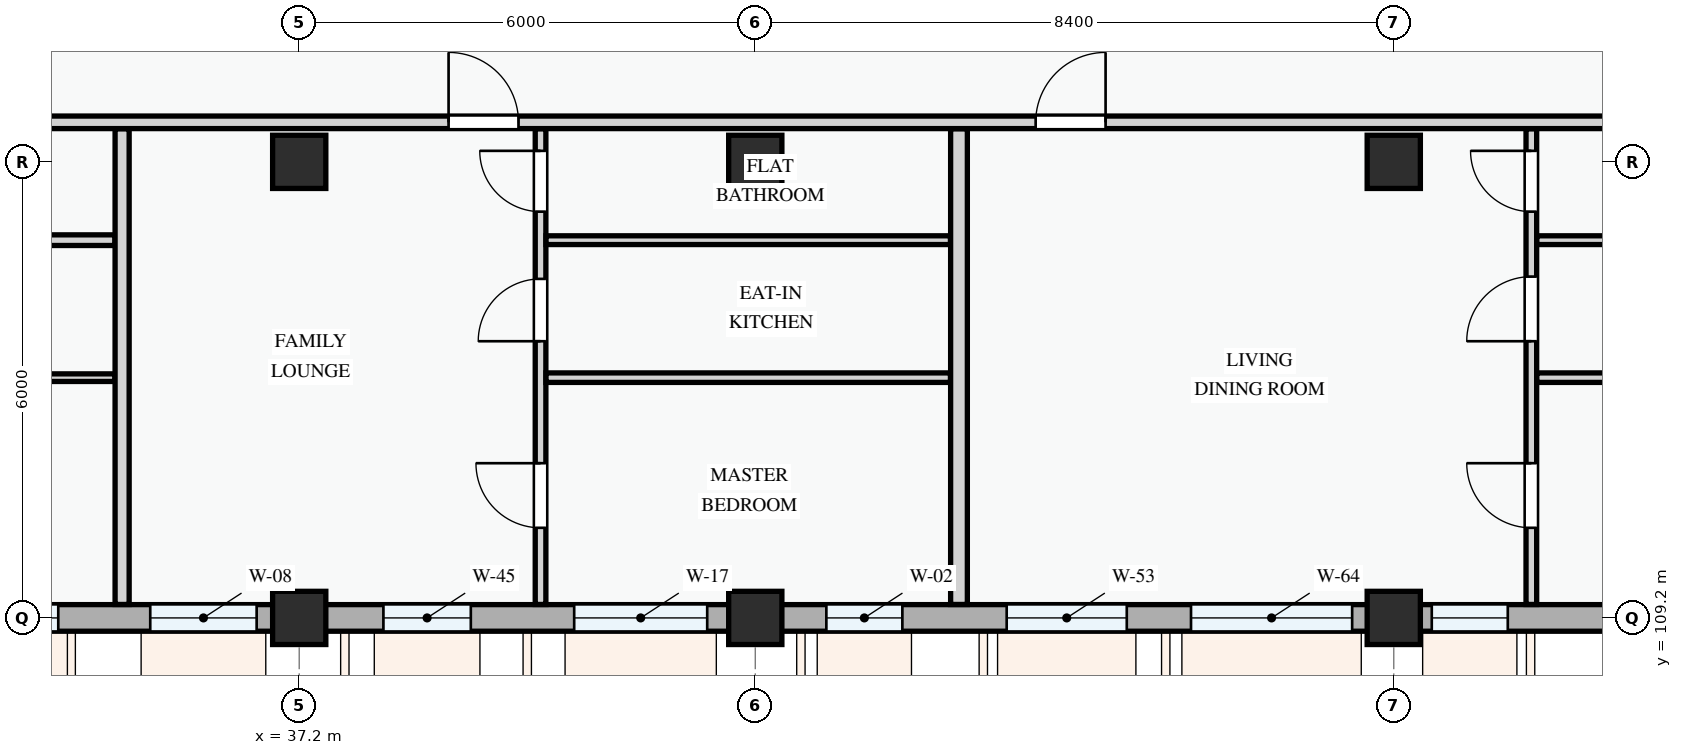
"""IFC4 building model, lengths in metres.
Left out: names, types, materials, properties, quantities, classifications, styles, units other than length and angle.
Written with IfcOpenShell. Run it as: python <this file> out.ifc"""

import sys

from ifc_helpers import new_model, si_unit, direction, frame, frame_2d, origin, origin_2d, place, context, subcontext, project, spatial, rectangle, extrude, element, fill, save


model = new_model("IFC4")
c1 = context("Model", 3, precision=1e-05, world=origin(), true_north=direction((0.0, 1.0)))
c2 = subcontext(c1, "Body", "Model", "MODEL_VIEW")
j1 = project(units=[si_unit("LENGTHUNIT", "METRE"), si_unit("PLANEANGLEUNIT", "RADIAN")], contexts=[c1])
p1 = place(None, origin())
s1 = spatial("IfcSite", under=j1, at=p1, CompositionType="ELEMENT")
p2 = place(p1, origin())
s2 = spatial("IfcBuilding", under=s1, at=p2, CompositionType="ELEMENT")
p3 = place(p2, frame((0.0, 0.0, 14.7)))
s3 = spatial("IfcBuildingStorey", under=s2, at=p3, CompositionType="ELEMENT", Elevation=14.7)
for number, where, z_axis, x_axis in (
    (1, (37.2, 109.2, 0.0), (0.0, 0.0, 1.0), (1.0, 0.0, 0.0)),
    (2, (37.2, 115.2, 0.0), (0.0, 0.0, 1.0), (1.0, 0.0, 0.0)),
    (3, (43.2, 109.2, 0.0), (0.0, 0.0, 1.0), (1.0, 0.0, 0.0)),
    (4, (43.2, 115.2, 0.0), (0.0, 0.0, 1.0), (1.0, 0.0, 0.0)),
    (5, (51.6, 109.2, 0.0), (0.0, 0.0, 1.0), (1.0, 0.0, 0.0)),
    (6, (51.6, 115.2, 0.0), (0.0, 0.0, 1.0), (1.0, 0.0, 0.0)),
):
    element("IfcColumn", number, at=place(p3, frame(where, z_axis=z_axis, x_axis=x_axis)), inside=s3, PredefinedType="COLUMN", context=c2, shape_type="SweptSolid", body=[
        extrude(rectangle(XDim=0.7, YDim=0.7, at=origin_2d()), origin(), (0.0, 0.0, 1.0), 3.3),
    ])
p4 = place(p3, frame((28.8, 109.2, 0.0), z_axis=(0.0, 0.0, 1.0), x_axis=(1.0, 0.0, 0.0)))
e7 = element("IfcWall", 7, at=p4, inside=s3, PredefinedType="STANDARD", context=c2, shape_type="SweptSolid", body=[
    extrude(rectangle(XDim=8.4, YDim=0.35, at=frame_2d((4.2, 0.0))), origin(), (0.0, 0.0, 1.0), 2.375),
])
p5 = place(p4, frame((0.525, 0.0, 0.78)))
e8 = element("IfcOpeningElement", 8, at=p5, cuts=e7, PredefinedType="OPENING", context=c2, shape_type="SweptSolid", body=[
    extrude(rectangle(XDim=0.95, YDim=1.15, at=frame_2d((0.475, 0.575))), frame((0.0, 0.185, 0.0), z_axis=(0.0, -1.0, 0.0), x_axis=(1.0, 0.0, 0.0)), (0.0, 0.0, 1.0), 0.37),
])
p6 = place(p4, frame((2.65, 0.0, 0.78)))
e9 = element("IfcOpeningElement", 9, at=p6, cuts=e7, PredefinedType="OPENING", context=c2, shape_type="SweptSolid", body=[
    extrude(rectangle(XDim=2.58, YDim=1.48, at=frame_2d((1.29, 0.74))), frame((0.0, 0.185, 0.0), z_axis=(0.0, -1.0, 0.0), x_axis=(1.0, 0.0, 0.0)), (0.0, 0.0, 1.0), 0.37),
])
p7 = place(p4, frame((6.44, 0.0, 0.78)))
e10 = element("IfcOpeningElement", 10, at=p7, cuts=e7, PredefinedType="OPENING", context=c2, shape_type="SweptSolid", body=[
    extrude(rectangle(XDim=1.4, YDim=1.45, at=frame_2d((0.7, 0.725))), frame((0.0, 0.185, 0.0), z_axis=(0.0, -1.0, 0.0), x_axis=(1.0, 0.0, 0.0)), (0.0, 0.0, 1.0), 0.37),
])
p8 = place(p3, frame((37.2, 109.2, 0.0), z_axis=(0.0, 0.0, 1.0), x_axis=(1.0, 0.0, 0.0)))
e11 = element("IfcWall", 11, at=p8, inside=s3, PredefinedType="STANDARD", context=c2, shape_type="SweptSolid", body=[
    extrude(rectangle(XDim=6.0, YDim=0.35, at=frame_2d((3.0, 0.0))), origin(), (0.0, 0.0, 1.0), 2.475),
])
p9 = place(p8, frame((1.107, 0.0, 0.78)))
e12 = element("IfcOpeningElement", 12, at=p9, cuts=e11, PredefinedType="OPENING", context=c2, shape_type="SweptSolid", body=[
    extrude(rectangle(XDim=1.15, YDim=1.25, at=frame_2d((0.575, 0.625))), frame((0.0, 0.185, 0.0), z_axis=(0.0, -1.0, 0.0), x_axis=(1.0, 0.0, 0.0)), (0.0, 0.0, 1.0), 0.37),
])
p10 = place(p8, frame((3.617, 0.0, 0.78)))
e13 = element("IfcOpeningElement", 13, at=p10, cuts=e11, PredefinedType="OPENING", context=c2, shape_type="SweptSolid", body=[
    extrude(rectangle(XDim=1.75, YDim=1.45, at=frame_2d((0.875, 0.725))), frame((0.0, 0.185, 0.0), z_axis=(0.0, -1.0, 0.0), x_axis=(1.0, 0.0, 0.0)), (0.0, 0.0, 1.0), 0.37),
])
p11 = place(p3, frame((43.2, 109.2, 0.0), z_axis=(0.0, 0.0, 1.0), x_axis=(1.0, 0.0, 0.0)))
e14 = element("IfcWall", 14, at=p11, inside=s3, PredefinedType="STANDARD", context=c2, shape_type="SweptSolid", body=[
    extrude(rectangle(XDim=8.4, YDim=0.35, at=frame_2d((4.2, 0.0))), origin(), (0.0, 0.0, 1.0), 2.375),
])
p12 = place(p11, frame((0.935, 0.0, 0.78)))
e15 = element("IfcOpeningElement", 15, at=p12, cuts=e14, PredefinedType="OPENING", context=c2, shape_type="SweptSolid", body=[
    extrude(rectangle(XDim=1.0, YDim=1.25, at=frame_2d((0.5, 0.625))), frame((0.0, 0.185, 0.0), z_axis=(0.0, -1.0, 0.0), x_axis=(1.0, 0.0, 0.0)), (0.0, 0.0, 1.0), 0.37),
])
p13 = place(p11, frame((3.308, 0.0, 0.78)))
e16 = element("IfcOpeningElement", 16, at=p13, cuts=e14, PredefinedType="OPENING", context=c2, shape_type="SweptSolid", body=[
    extrude(rectangle(XDim=1.58, YDim=1.48, at=frame_2d((0.79, 0.74))), frame((0.0, 0.185, 0.0), z_axis=(0.0, -1.0, 0.0), x_axis=(1.0, 0.0, 0.0)), (0.0, 0.0, 1.0), 0.37),
])
p14 = place(p11, frame((5.732, 0.0, 0.78)))
e17 = element("IfcOpeningElement", 17, at=p14, cuts=e14, PredefinedType="OPENING", context=c2, shape_type="SweptSolid", body=[
    extrude(rectangle(XDim=2.12, YDim=1.44, at=frame_2d((1.06, 0.72))), frame((0.0, 0.185, 0.0), z_axis=(0.0, -1.0, 0.0), x_axis=(1.0, 0.0, 0.0)), (0.0, 0.0, 1.0), 0.37),
])
p15 = place(p3, frame((51.6, 109.2, 0.0), z_axis=(0.0, 0.0, 1.0), x_axis=(1.0, 0.0, 0.0)))
e18 = element("IfcWall", 18, at=p15, inside=s3, PredefinedType="STANDARD", context=c2, shape_type="SweptSolid", body=[
    extrude(rectangle(XDim=6.0, YDim=0.35, at=frame_2d((3.0, 0.0))), origin(), (0.0, 0.0, 1.0), 2.475),
])
p16 = place(p15, frame((0.5, 0.0, 0.78)))
e19 = element("IfcOpeningElement", 19, at=p16, cuts=e18, PredefinedType="OPENING", context=c2, shape_type="SweptSolid", body=[
    extrude(rectangle(XDim=1.0, YDim=1.25, at=frame_2d((0.5, 0.625))), frame((0.0, 0.185, 0.0), z_axis=(0.0, -1.0, 0.0), x_axis=(1.0, 0.0, 0.0)), (0.0, 0.0, 1.0), 0.37),
])
p17 = place(p15, frame((3.185, 0.0, 0.78)))
e20 = element("IfcOpeningElement", 20, at=p17, cuts=e18, PredefinedType="OPENING", context=c2, shape_type="SweptSolid", body=[
    extrude(rectangle(XDim=1.25, YDim=1.3, at=frame_2d((0.625, 0.65))), frame((0.0, 0.185, 0.0), z_axis=(0.0, -1.0, 0.0), x_axis=(1.0, 0.0, 0.0)), (0.0, 0.0, 1.0), 0.37),
])
p18 = place(p3, frame((30.669, 112.361, 0.0), z_axis=(0.0, 0.0, 1.0), x_axis=(1.0, 0.0, 0.0)))
e21 = element("IfcWall", 21, at=p18, inside=s3, PredefinedType="PARTITIONING", context=c2, shape_type="SweptSolid", body=[
    extrude(rectangle(XDim=4.106, YDim=0.1, at=frame_2d((2.053, 0.0))), origin(), (0.0, 0.0, 1.0), 3.0),
])
p19 = place(p3, frame((30.669, 114.17, 0.0), z_axis=(0.0, 0.0, 1.0), x_axis=(1.0, 0.0, 0.0)))
e22 = element("IfcWall", 22, at=p19, inside=s3, PredefinedType="PARTITIONING", context=c2, shape_type="SweptSolid", body=[
    extrude(rectangle(XDim=4.106, YDim=0.14, at=frame_2d((2.053, 0.0))), origin(), (0.0, 0.0, 1.0), 3.0),
])
p20 = place(p3, frame((40.375, 109.377, 0.0), z_axis=(0.0, 0.0, 1.0), x_axis=(0.0, 1.0, 0.0)))
e23 = element("IfcWall", 23, at=p20, inside=s3, PredefinedType="PARTITIONING", context=c2, shape_type="SweptSolid", body=[
    extrude(rectangle(XDim=6.259, YDim=0.14, at=frame_2d((3.129, 0.0))), origin(), (0.0, 0.0, 1.0), 3.0),
])
p21 = place(p20, frame((1.008, 0.0, 0.0)))
e24 = element("IfcOpeningElement", 24, at=p21, cuts=e23, PredefinedType="OPENING", context=c2, shape_type="SweptSolid", body=[
    extrude(rectangle(XDim=0.85, YDim=2.1, at=frame_2d((0.425, 1.05))), frame((0.0, 0.08, 0.0), z_axis=(0.0, -1.0, 0.0), x_axis=(1.0, 0.0, 0.0)), (0.0, 0.0, 1.0), 0.16),
])
p22 = place(p20, frame((3.463, 0.0, 0.0)))
e25 = element("IfcOpeningElement", 25, at=p22, cuts=e23, PredefinedType="OPENING", context=c2, shape_type="SweptSolid", body=[
    extrude(rectangle(XDim=0.82, YDim=2.08, at=frame_2d((0.41, 1.04))), frame((0.0, 0.08, 0.0), z_axis=(0.0, -1.0, 0.0), x_axis=(1.0, 0.0, 0.0)), (0.0, 0.0, 1.0), 0.16),
])
p23 = place(p20, frame((5.168, 0.0, 0.0)))
e26 = element("IfcOpeningElement", 26, at=p23, cuts=e23, PredefinedType="OPENING", context=c2, shape_type="SweptSolid", body=[
    extrude(rectangle(XDim=0.8, YDim=2.1, at=frame_2d((0.4, 1.05))), frame((0.0, 0.08, 0.0), z_axis=(0.0, -1.0, 0.0), x_axis=(1.0, 0.0, 0.0)), (0.0, 0.0, 1.0), 0.16),
])
p24 = place(p3, frame((40.447, 112.361, 0.0), z_axis=(0.0, 0.0, 1.0), x_axis=(1.0, 0.0, 0.0)))
e27 = element("IfcWall", 27, at=p24, inside=s3, PredefinedType="PARTITIONING", context=c2, shape_type="SweptSolid", body=[
    extrude(rectangle(XDim=5.321, YDim=0.125, at=frame_2d((2.661, 0.0))), origin(), (0.0, 0.0, 1.0), 3.0),
])
p25 = place(p3, frame((40.447, 114.17, 0.0), z_axis=(0.0, 0.0, 1.0), x_axis=(1.0, 0.0, 0.0)))
e28 = element("IfcWall", 28, at=p25, inside=s3, PredefinedType="PARTITIONING", context=c2, shape_type="SweptSolid", body=[
    extrude(rectangle(XDim=5.321, YDim=0.115, at=frame_2d((2.661, 0.0))), origin(), (0.0, 0.0, 1.0), 3.0),
])
p26 = place(p3, frame((34.87, 109.377, 0.0), z_axis=(0.0, 0.0, 1.0), x_axis=(0.0, 1.0, 0.0)))
e29 = element("IfcWall", 29, at=p26, inside=s3, PredefinedType="PARTITIONING", context=c2, shape_type="SweptSolid", body=[
    extrude(rectangle(XDim=6.259, YDim=0.185, at=frame_2d((3.129, 0.0))), origin(), (0.0, 0.0, 1.0), 3.0),
])
p27 = place(p3, frame((53.41, 109.377, 0.0), z_axis=(0.0, 0.0, 1.0), x_axis=(0.0, 1.0, 0.0)))
e30 = element("IfcWall", 30, at=p27, inside=s3, PredefinedType="PARTITIONING", context=c2, shape_type="SweptSolid", body=[
    extrude(rectangle(XDim=6.259, YDim=0.14, at=frame_2d((3.129, 0.0))), origin(), (0.0, 0.0, 1.0), 3.0),
])
p28 = place(p27, frame((1.008, 0.0, 0.0)))
e31 = element("IfcOpeningElement", 31, at=p28, cuts=e30, PredefinedType="OPENING", context=c2, shape_type="SweptSolid", body=[
    extrude(rectangle(XDim=0.85, YDim=2.1, at=frame_2d((0.425, 1.05))), frame((0.0, 0.08, 0.0), z_axis=(0.0, -1.0, 0.0), x_axis=(1.0, 0.0, 0.0)), (0.0, 0.0, 1.0), 0.16),
])
p29 = place(p27, frame((3.463, 0.0, 0.0)))
e32 = element("IfcOpeningElement", 32, at=p29, cuts=e30, PredefinedType="OPENING", context=c2, shape_type="SweptSolid", body=[
    extrude(rectangle(XDim=0.85, YDim=2.1, at=frame_2d((0.425, 1.05))), frame((0.0, 0.08, 0.0), z_axis=(0.0, -1.0, 0.0), x_axis=(1.0, 0.0, 0.0)), (0.0, 0.0, 1.0), 0.16),
])
p30 = place(p27, frame((5.168, 0.0, 0.0)))
e33 = element("IfcOpeningElement", 33, at=p30, cuts=e30, PredefinedType="OPENING", context=c2, shape_type="SweptSolid", body=[
    extrude(rectangle(XDim=0.8, YDim=2.1, at=frame_2d((0.4, 1.05))), frame((0.0, 0.08, 0.0), z_axis=(0.0, -1.0, 0.0), x_axis=(1.0, 0.0, 0.0)), (0.0, 0.0, 1.0), 0.16),
])
p31 = place(p3, frame((53.482, 112.361, 0.0), z_axis=(0.0, 0.0, 1.0), x_axis=(1.0, 0.0, 0.0)))
e34 = element("IfcWall", 34, at=p31, inside=s3, PredefinedType="PARTITIONING", context=c2, shape_type="SweptSolid", body=[
    extrude(rectangle(XDim=3.941, YDim=0.125, at=frame_2d((1.971, 0.0))), origin(), (0.0, 0.0, 1.0), 3.0),
])
p32 = place(p3, frame((53.482, 114.17, 0.0), z_axis=(0.0, 0.0, 1.0), x_axis=(1.0, 0.0, 0.0)))
e35 = element("IfcWall", 35, at=p32, inside=s3, PredefinedType="PARTITIONING", context=c2, shape_type="SweptSolid", body=[
    extrude(rectangle(XDim=3.941, YDim=0.115, at=frame_2d((1.971, 0.0))), origin(), (0.0, 0.0, 1.0), 3.0),
])
p33 = place(p3, frame((45.88, 109.377, 0.0), z_axis=(0.0, 0.0, 1.0), x_axis=(0.0, 1.0, 0.0)))
e36 = element("IfcWall", 36, at=p33, inside=s3, PredefinedType="PARTITIONING", context=c2, shape_type="SweptSolid", body=[
    extrude(rectangle(XDim=6.259, YDim=0.22, at=frame_2d((3.129, 0.0))), origin(), (0.0, 0.0, 1.0), 3.0),
])
p34 = place(p3, frame((25.15, 115.72, 0.0), z_axis=(0.0, 0.0, 1.0), x_axis=(1.0, 0.0, 0.0)))
e37 = element("IfcWall", 37, at=p34, inside=s3, PredefinedType="PARTITIONING", context=c2, shape_type="SweptSolid", body=[
    extrude(rectangle(XDim=32.273, YDim=0.165, at=frame_2d((16.137, 0.0))), origin(), (0.0, 0.0, 1.0), 3.0),
])
p35 = place(p34, frame((0.25, 0.0, 0.0)))
e38 = element("IfcOpeningElement", 38, at=p35, cuts=e37, PredefinedType="OPENING", context=c2, shape_type="SweptSolid", body=[
    extrude(rectangle(XDim=0.92, YDim=2.1, at=frame_2d((0.46, 1.05))), frame((0.0, 0.093, 0.0), z_axis=(0.0, -1.0, 0.0), x_axis=(1.0, 0.0, 0.0)), (0.0, 0.0, 1.0), 0.185),
])
p36 = place(p34, frame((14.015, 0.0, 0.0)))
e39 = element("IfcOpeningElement", 39, at=p36, cuts=e37, PredefinedType="OPENING", context=c2, shape_type="SweptSolid", body=[
    extrude(rectangle(XDim=0.92, YDim=2.1, at=frame_2d((0.46, 1.05))), frame((0.0, 0.093, 0.0), z_axis=(0.0, -1.0, 0.0), x_axis=(1.0, 0.0, 0.0)), (0.0, 0.0, 1.0), 0.185),
])
p37 = place(p34, frame((21.739, 0.0, 0.0)))
e40 = element("IfcOpeningElement", 40, at=p37, cuts=e37, PredefinedType="OPENING", context=c2, shape_type="SweptSolid", body=[
    extrude(rectangle(XDim=0.92, YDim=2.1, at=frame_2d((0.46, 1.05))), frame((0.0, 0.093, 0.0), z_axis=(0.0, -1.0, 0.0), x_axis=(1.0, 0.0, 0.0)), (0.0, 0.0, 1.0), 0.185),
])
p38 = place(p6, origin())
e41 = element("IfcWindow", 41, at=p38, inside=s3, PartitioningType="DOUBLE_PANEL_VERTICAL", PredefinedType="WINDOW", context=c2, shape_type="SweptSolid", body=[
    extrude(rectangle(XDim=2.58, YDim=1.48, at=frame_2d((1.29, 0.74))), frame((0.0, 0.03, 0.0), z_axis=(0.0, -1.0, 0.0), x_axis=(1.0, 0.0, 0.0)), (0.0, 0.0, 1.0), 0.06),
])
fill(e9, e41)
p39 = place(p7, origin())
e42 = element("IfcWindow", 42, at=p39, inside=s3, PartitioningType="SINGLE_PANEL", PredefinedType="WINDOW", context=c2, shape_type="SweptSolid", body=[
    extrude(rectangle(XDim=1.4, YDim=1.45, at=frame_2d((0.7, 0.725))), frame((0.0, 0.03, 0.0), z_axis=(0.0, -1.0, 0.0), x_axis=(1.0, 0.0, 0.0)), (0.0, 0.0, 1.0), 0.06),
])
fill(e10, e42)
p40 = place(p9, origin())
e43 = element("IfcWindow", 43, at=p40, inside=s3, PartitioningType="SINGLE_PANEL", PredefinedType="WINDOW", context=c2, shape_type="SweptSolid", body=[
    extrude(rectangle(XDim=1.15, YDim=1.25, at=frame_2d((0.575, 0.625))), frame((0.0, 0.03, 0.0), z_axis=(0.0, -1.0, 0.0), x_axis=(1.0, 0.0, 0.0)), (0.0, 0.0, 1.0), 0.06),
])
fill(e12, e43)
p41 = place(p10, origin())
e44 = element("IfcWindow", 44, at=p41, inside=s3, PartitioningType="DOUBLE_PANEL_VERTICAL", PredefinedType="WINDOW", context=c2, shape_type="SweptSolid", body=[
    extrude(rectangle(XDim=1.75, YDim=1.45, at=frame_2d((0.875, 0.725))), frame((0.0, 0.03, 0.0), z_axis=(0.0, -1.0, 0.0), x_axis=(1.0, 0.0, 0.0)), (0.0, 0.0, 1.0), 0.06),
])
fill(e13, e44)
p42 = place(p12, origin())
e45 = element("IfcWindow", 45, at=p42, inside=s3, PartitioningType="SINGLE_PANEL", PredefinedType="WINDOW", context=c2, shape_type="SweptSolid", body=[
    extrude(rectangle(XDim=1.0, YDim=1.25, at=frame_2d((0.5, 0.625))), frame((0.0, 0.03, 0.0), z_axis=(0.0, -1.0, 0.0), x_axis=(1.0, 0.0, 0.0)), (0.0, 0.0, 1.0), 0.06),
])
fill(e15, e45)
p43 = place(p13, origin())
e46 = element("IfcWindow", 46, at=p43, inside=s3, PartitioningType="SINGLE_PANEL", PredefinedType="WINDOW", context=c2, shape_type="SweptSolid", body=[
    extrude(rectangle(XDim=1.58, YDim=1.48, at=frame_2d((0.79, 0.74))), frame((0.0, 0.03, 0.0), z_axis=(0.0, -1.0, 0.0), x_axis=(1.0, 0.0, 0.0)), (0.0, 0.0, 1.0), 0.06),
])
fill(e16, e46)
p44 = place(p14, origin())
e47 = element("IfcWindow", 47, at=p44, inside=s3, PartitioningType="DOUBLE_PANEL_VERTICAL", PredefinedType="WINDOW", context=c2, shape_type="SweptSolid", body=[
    extrude(rectangle(XDim=2.12, YDim=1.44, at=frame_2d((1.06, 0.72))), frame((0.0, 0.03, 0.0), z_axis=(0.0, -1.0, 0.0), x_axis=(1.0, 0.0, 0.0)), (0.0, 0.0, 1.0), 0.06),
])
fill(e17, e47)
p45 = place(p16, origin())
e48 = element("IfcWindow", 48, at=p45, inside=s3, PartitioningType="SINGLE_PANEL", PredefinedType="WINDOW", context=c2, shape_type="SweptSolid", body=[
    extrude(rectangle(XDim=1.0, YDim=1.25, at=frame_2d((0.5, 0.625))), frame((0.0, 0.03, 0.0), z_axis=(0.0, -1.0, 0.0), x_axis=(1.0, 0.0, 0.0)), (0.0, 0.0, 1.0), 0.06),
])
fill(e19, e48)
p46 = place(p21, origin())
e49 = element("IfcDoor", 49, at=p46, inside=s3, OperationType="SINGLE_SWING_RIGHT", PredefinedType="DOOR", context=c2, shape_type="SweptSolid", body=[
    extrude(rectangle(XDim=0.85, YDim=2.1, at=frame_2d((0.425, 1.05))), frame((0.0, 0.025, 0.0), z_axis=(0.0, -1.0, 0.0), x_axis=(1.0, 0.0, 0.0)), (0.0, 0.0, 1.0), 0.05),
])
fill(e24, e49)
p47 = place(p22, origin())
e50 = element("IfcDoor", 50, at=p47, inside=s3, OperationType="SINGLE_SWING_LEFT", PredefinedType="DOOR", context=c2, shape_type="SweptSolid", body=[
    extrude(rectangle(XDim=0.82, YDim=2.08, at=frame_2d((0.41, 1.04))), frame((0.0, 0.025, 0.0), z_axis=(0.0, -1.0, 0.0), x_axis=(1.0, 0.0, 0.0)), (0.0, 0.0, 1.0), 0.05),
])
fill(e25, e50)
p48 = place(p23, origin())
e51 = element("IfcDoor", 51, at=p48, inside=s3, OperationType="SINGLE_SWING_RIGHT", PredefinedType="DOOR", context=c2, shape_type="SweptSolid", body=[
    extrude(rectangle(XDim=0.8, YDim=2.1, at=frame_2d((0.4, 1.05))), frame((0.0, 0.025, 0.0), z_axis=(0.0, -1.0, 0.0), x_axis=(1.0, 0.0, 0.0)), (0.0, 0.0, 1.0), 0.05),
])
fill(e26, e51)
p49 = place(p28, origin())
e52 = element("IfcDoor", 52, at=p49, inside=s3, OperationType="SINGLE_SWING_RIGHT", PredefinedType="DOOR", context=c2, shape_type="SweptSolid", body=[
    extrude(rectangle(XDim=0.85, YDim=2.1, at=frame_2d((0.425, 1.05))), frame((0.0, 0.025, 0.0), z_axis=(0.0, -1.0, 0.0), x_axis=(1.0, 0.0, 0.0)), (0.0, 0.0, 1.0), 0.05),
])
fill(e31, e52)
p50 = place(p29, origin())
e53 = element("IfcDoor", 53, at=p50, inside=s3, OperationType="SINGLE_SWING_LEFT", PredefinedType="DOOR", context=c2, shape_type="SweptSolid", body=[
    extrude(rectangle(XDim=0.85, YDim=2.1, at=frame_2d((0.425, 1.05))), frame((0.0, 0.025, 0.0), z_axis=(0.0, -1.0, 0.0), x_axis=(1.0, 0.0, 0.0)), (0.0, 0.0, 1.0), 0.05),
])
fill(e32, e53)
p51 = place(p30, origin())
e54 = element("IfcDoor", 54, at=p51, inside=s3, OperationType="SINGLE_SWING_RIGHT", PredefinedType="DOOR", context=c2, shape_type="SweptSolid", body=[
    extrude(rectangle(XDim=0.8, YDim=2.1, at=frame_2d((0.4, 1.05))), frame((0.0, 0.025, 0.0), z_axis=(0.0, -1.0, 0.0), x_axis=(1.0, 0.0, 0.0)), (0.0, 0.0, 1.0), 0.05),
])
fill(e33, e54)
p52 = place(p36, origin())
e55 = element("IfcDoor", 55, at=p52, inside=s3, OperationType="SINGLE_SWING_LEFT", PredefinedType="DOOR", context=c2, shape_type="SweptSolid", body=[
    extrude(rectangle(XDim=0.92, YDim=2.1, at=frame_2d((0.46, 1.05))), frame((0.0, 0.025, 0.0), z_axis=(0.0, -1.0, 0.0), x_axis=(1.0, 0.0, 0.0)), (0.0, 0.0, 1.0), 0.05),
])
fill(e39, e55)
p53 = place(p37, origin())
e56 = element("IfcDoor", 56, at=p53, inside=s3, OperationType="SINGLE_SWING_RIGHT", PredefinedType="DOOR", context=c2, shape_type="SweptSolid", body=[
    extrude(rectangle(XDim=0.92, YDim=2.1, at=frame_2d((0.46, 1.05))), frame((0.0, 0.025, 0.0), z_axis=(0.0, -1.0, 0.0), x_axis=(1.0, 0.0, 0.0)), (0.0, 0.0, 1.0), 0.05),
])
fill(e40, e56)
save(model, sys.argv[1])
